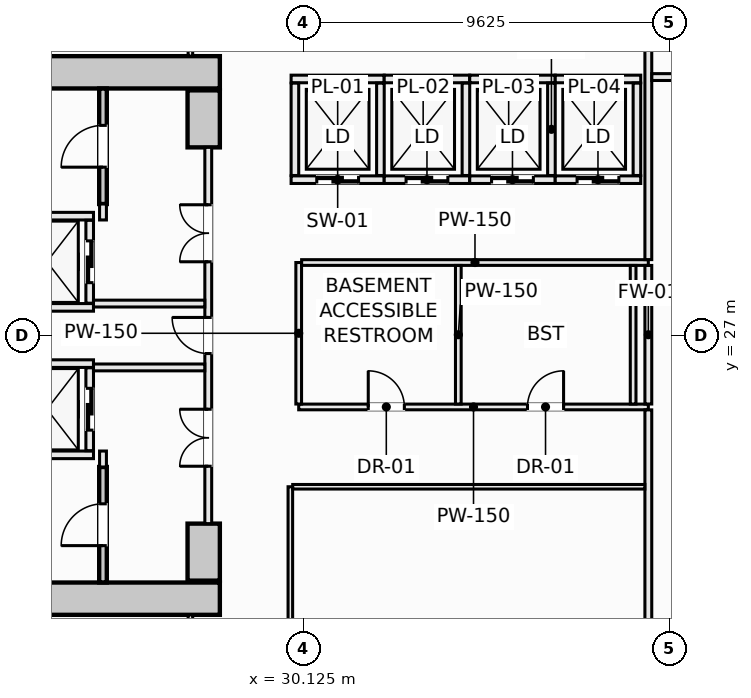
"""IFC4 building model, lengths in metres.
Left out: names, types, materials, properties, quantities, classifications, styles, units other than length and angle.
Written with IfcOpenShell. Run it as: python <this file> out.ifc"""

import sys

from ifc_helpers import new_model, si_unit, direction, frame, frame_2d, origin, place, context, subcontext, project, spatial, rectangle, extrude, element, fill, save


model = new_model("IFC4")
c1 = context("Model", 3, precision=1e-05, world=origin(), true_north=direction((0.0, 1.0)))
c2 = subcontext(c1, "Body", "Model", "MODEL_VIEW")
j1 = project(units=[si_unit("LENGTHUNIT", "METRE"), si_unit("PLANEANGLEUNIT", "RADIAN")], contexts=[c1])
p1 = place(None, origin())
s1 = spatial("IfcSite", under=j1, at=p1, CompositionType="ELEMENT")
p2 = place(p1, origin())
s2 = spatial("IfcBuilding", under=s1, at=p2, CompositionType="ELEMENT")
p3 = place(p2, frame((0.0, 0.0, -13.5)))
s3 = spatial("IfcBuildingStorey", under=s2, at=p3, CompositionType="ELEMENT", Elevation=-13.5)
for number, where, z_axis, x_axis in (
    (1, (14.075, 33.925, -0.5), (0.0, 0.0, 1.0), (1.0, 0.0, 0.0)),
    (2, (14.075, 20.075, -0.5), (0.0, 0.0, 1.0), (1.0, 0.0, 0.0)),
):
    element("IfcWall", number, at=place(p3, frame(where, z_axis=z_axis, x_axis=x_axis)), inside=s3, PredefinedType="SHEAR", context=c2, shape_type="SweptSolid", body=[
        extrude(rectangle(XDim=13.85, YDim=0.85, at=frame_2d((6.925, 0.0))), origin(), (0.0, 0.0, 1.0), 4.68),
    ])
for number, where, z_axis, x_axis in (
    (3, (27.5, 31.95, -0.5), (0.0, 0.0, 1.0), (0.0, 1.0, 0.0)),
    (4, (27.5, 20.55, -0.5), (0.0, 0.0, 1.0), (0.0, 1.0, 0.0)),
):
    element("IfcWall", number, at=place(p3, frame(where, z_axis=z_axis, x_axis=x_axis)), inside=s3, PredefinedType="SHEAR", context=c2, shape_type="SweptSolid", body=[
        extrude(rectangle(XDim=1.5, YDim=0.85, at=frame_2d((0.75, 0.0))), origin(), (0.0, 0.0, 1.0), 4.68),
    ])
p4 = place(p3, frame((24.85, 30.46, -0.5), z_axis=(0.0, 0.0, 1.0), x_axis=(0.0, 1.0, 0.0)))
e5 = element("IfcWall", 5, at=p4, inside=s3, PredefinedType="SHEAR", context=c2, shape_type="SweptSolid", body=[
    extrude(rectangle(XDim=3.038, YDim=0.2, at=frame_2d((1.519, 0.0))), origin(), (0.0, 0.0, 1.0), 4.68),
])
p5 = place(p4, frame((0.969, 0.0, 0.5)))
e6 = element("IfcOpeningElement", 6, at=p5, cuts=e5, PredefinedType="OPENING", context=c2, shape_type="SweptSolid", body=[
    extrude(rectangle(XDim=1.1, YDim=2.15, at=frame_2d((0.55, 1.075))), frame((0.0, 0.11, 0.0), z_axis=(0.0, -1.0, 0.0), x_axis=(1.0, 0.0, 0.0)), (0.0, 0.0, 1.0), 0.22),
])
p6 = place(p3, frame((24.85, 20.502, -0.5), z_axis=(0.0, 0.0, 1.0), x_axis=(0.0, 1.0, 0.0)))
e7 = element("IfcWall", 7, at=p6, inside=s3, PredefinedType="SHEAR", context=c2, shape_type="SweptSolid", body=[
    extrude(rectangle(XDim=3.038, YDim=0.2, at=frame_2d((1.519, 0.0))), origin(), (0.0, 0.0, 1.0), 4.68),
])
p7 = place(p6, frame((0.969, 0.0, 0.5)))
e8 = element("IfcOpeningElement", 8, at=p7, cuts=e7, PredefinedType="OPENING", context=c2, shape_type="SweptSolid", body=[
    extrude(rectangle(XDim=1.1, YDim=2.15, at=frame_2d((0.55, 1.075))), frame((0.0, 0.11, 0.0), z_axis=(0.0, -1.0, 0.0), x_axis=(1.0, 0.0, 0.0)), (0.0, 0.0, 1.0), 0.22),
])
for number, where, z_axis, x_axis in (
    (9, (22.15, 30.14, 0.0), (0.0, 0.0, 1.0), (1.0, 0.0, 0.0)),
    (10, (22.15, 27.74, 0.0), (0.0, 0.0, 1.0), (1.0, 0.0, 0.0)),
):
    element("IfcWall", number, at=place(p3, frame(where, z_axis=z_axis, x_axis=x_axis)), inside=s3, PredefinedType="SOLIDWALL", context=c2, shape_type="SweptSolid", body=[
        extrude(rectangle(XDim=2.45, YDim=0.2, at=frame_2d((1.225, 0.0))), origin(), (0.0, 0.0, 1.0), 4.18),
    ])
p8 = place(p3, frame((24.5, 27.85, 0.0), z_axis=(0.0, 0.0, 1.0), x_axis=(0.0, 1.0, 0.0)))
e11 = element("IfcWall", 11, at=p8, inside=s3, PredefinedType="SOLIDWALL", context=c2, shape_type="SweptSolid", body=[
    extrude(rectangle(XDim=2.18, YDim=0.2, at=frame_2d((1.09, 0.0))), origin(), (0.0, 0.0, 1.0), 4.18),
])
p9 = place(p8, frame((0.54, 0.0, 0.0)))
e12 = element("IfcOpeningElement", 12, at=p9, cuts=e11, PredefinedType="OPENING", context=c2, shape_type="SweptSolid", body=[
    extrude(rectangle(XDim=1.1, YDim=2.2, at=frame_2d((0.55, 1.1))), frame((0.0, 0.11, 0.0), z_axis=(0.0, -1.0, 0.0), x_axis=(1.0, 0.0, 0.0)), (0.0, 0.0, 1.0), 0.22),
])
for number, where, z_axis, x_axis in (
    (13, (22.15, 26.26, 0.0), (0.0, 0.0, 1.0), (1.0, 0.0, 0.0)),
    (14, (22.15, 23.86, 0.0), (0.0, 0.0, 1.0), (1.0, 0.0, 0.0)),
):
    element("IfcWall", number, at=place(p3, frame(where, z_axis=z_axis, x_axis=x_axis)), inside=s3, PredefinedType="SOLIDWALL", context=c2, shape_type="SweptSolid", body=[
        extrude(rectangle(XDim=2.45, YDim=0.2, at=frame_2d((1.225, 0.0))), origin(), (0.0, 0.0, 1.0), 4.18),
    ])
p10 = place(p3, frame((24.5, 23.97, 0.0), z_axis=(0.0, 0.0, 1.0), x_axis=(0.0, 1.0, 0.0)))
e15 = element("IfcWall", 15, at=p10, inside=s3, PredefinedType="SOLIDWALL", context=c2, shape_type="SweptSolid", body=[
    extrude(rectangle(XDim=2.18, YDim=0.2, at=frame_2d((1.09, 0.0))), origin(), (0.0, 0.0, 1.0), 4.18),
])
p11 = place(p10, frame((0.54, 0.0, 0.0)))
e16 = element("IfcOpeningElement", 16, at=p11, cuts=e15, PredefinedType="OPENING", context=c2, shape_type="SweptSolid", body=[
    extrude(rectangle(XDim=1.1, YDim=2.2, at=frame_2d((0.55, 1.1))), frame((0.0, 0.11, 0.0), z_axis=(0.0, -1.0, 0.0), x_axis=(1.0, 0.0, 0.0)), (0.0, 0.0, 1.0), 0.22),
])
p12 = place(p3, frame((29.8, 33.75, 0.0), z_axis=(0.0, 0.0, 1.0), x_axis=(1.0, 0.0, 0.0)))
e17 = element("IfcWall", 17, at=p12, inside=s3, PredefinedType="SOLIDWALL", context=c2, shape_type="SweptSolid", body=[
    extrude(rectangle(XDim=2.45, YDim=0.2, at=frame_2d((1.225, 0.0))), origin(), (0.0, 0.0, 1.0), 4.18),
])
p13 = place(p3, frame((29.8, 31.1, 0.0), z_axis=(0.0, 0.0, 1.0), x_axis=(1.0, 0.0, 0.0)))
e18 = element("IfcWall", 18, at=p13, inside=s3, PredefinedType="SOLIDWALL", context=c2, shape_type="SweptSolid", body=[
    extrude(rectangle(XDim=2.45, YDim=0.2, at=frame_2d((1.225, 0.0))), origin(), (0.0, 0.0, 1.0), 4.18),
])
p14 = place(p13, frame((0.675, 0.0, 0.0)))
e19 = element("IfcOpeningElement", 19, at=p14, cuts=e18, PredefinedType="OPENING", context=c2, shape_type="SweptSolid", body=[
    extrude(rectangle(XDim=1.1, YDim=2.2, at=frame_2d((0.55, 1.1))), frame((0.0, 0.11, 0.0), z_axis=(0.0, -1.0, 0.0), x_axis=(1.0, 0.0, 0.0)), (0.0, 0.0, 1.0), 0.22),
])
for number, where, z_axis, x_axis in (
    (20, (29.9, 31.21, 0.0), (0.0, 0.0, 1.0), (0.0, 1.0, 0.0)),
    (21, (32.15, 31.21, 0.0), (0.0, 0.0, 1.0), (0.0, 1.0, 0.0)),
):
    element("IfcWall", number, at=place(p3, frame(where, z_axis=z_axis, x_axis=x_axis)), inside=s3, PredefinedType="SOLIDWALL", context=c2, shape_type="SweptSolid", body=[
        extrude(rectangle(XDim=2.43, YDim=0.2, at=frame_2d((1.215, 0.0))), origin(), (0.0, 0.0, 1.0), 4.18),
    ])
p15 = place(p3, frame((32.25, 33.75, 0.0), z_axis=(0.0, 0.0, 1.0), x_axis=(1.0, 0.0, 0.0)))
e22 = element("IfcWall", 22, at=p15, inside=s3, PredefinedType="SOLIDWALL", context=c2, shape_type="SweptSolid", body=[
    extrude(rectangle(XDim=2.25, YDim=0.2, at=frame_2d((1.125, 0.0))), origin(), (0.0, 0.0, 1.0), 4.18),
])
p16 = place(p3, frame((32.25, 31.1, 0.0), z_axis=(0.0, 0.0, 1.0), x_axis=(1.0, 0.0, 0.0)))
e23 = element("IfcWall", 23, at=p16, inside=s3, PredefinedType="SOLIDWALL", context=c2, shape_type="SweptSolid", body=[
    extrude(rectangle(XDim=2.25, YDim=0.2, at=frame_2d((1.125, 0.0))), origin(), (0.0, 0.0, 1.0), 4.18),
])
p17 = place(p16, frame((0.575, 0.0, 0.0)))
e24 = element("IfcOpeningElement", 24, at=p17, cuts=e23, PredefinedType="OPENING", context=c2, shape_type="SweptSolid", body=[
    extrude(rectangle(XDim=1.1, YDim=2.2, at=frame_2d((0.55, 1.1))), frame((0.0, 0.11, 0.0), z_axis=(0.0, -1.0, 0.0), x_axis=(1.0, 0.0, 0.0)), (0.0, 0.0, 1.0), 0.22),
])
p18 = place(p3, frame((34.4, 31.21, 0.0), z_axis=(0.0, 0.0, 1.0), x_axis=(0.0, 1.0, 0.0)))
e25 = element("IfcWall", 25, at=p18, inside=s3, PredefinedType="SOLIDWALL", context=c2, shape_type="SweptSolid", body=[
    extrude(rectangle(XDim=2.43, YDim=0.2, at=frame_2d((1.215, 0.0))), origin(), (0.0, 0.0, 1.0), 4.18),
])
p19 = place(p3, frame((34.5, 33.75, 0.0), z_axis=(0.0, 0.0, 1.0), x_axis=(1.0, 0.0, 0.0)))
e26 = element("IfcWall", 26, at=p19, inside=s3, PredefinedType="SOLIDWALL", context=c2, shape_type="SweptSolid", body=[
    extrude(rectangle(XDim=2.25, YDim=0.2, at=frame_2d((1.125, 0.0))), origin(), (0.0, 0.0, 1.0), 4.18),
])
p20 = place(p3, frame((34.5, 31.1, 0.0), z_axis=(0.0, 0.0, 1.0), x_axis=(1.0, 0.0, 0.0)))
e27 = element("IfcWall", 27, at=p20, inside=s3, PredefinedType="SOLIDWALL", context=c2, shape_type="SweptSolid", body=[
    extrude(rectangle(XDim=2.25, YDim=0.2, at=frame_2d((1.125, 0.0))), origin(), (0.0, 0.0, 1.0), 4.18),
])
p21 = place(p20, frame((0.575, 0.0, 0.0)))
e28 = element("IfcOpeningElement", 28, at=p21, cuts=e27, PredefinedType="OPENING", context=c2, shape_type="SweptSolid", body=[
    extrude(rectangle(XDim=1.1, YDim=2.2, at=frame_2d((0.55, 1.1))), frame((0.0, 0.11, 0.0), z_axis=(0.0, -1.0, 0.0), x_axis=(1.0, 0.0, 0.0)), (0.0, 0.0, 1.0), 0.22),
])
p22 = place(p3, frame((36.65, 31.21, 0.0), z_axis=(0.0, 0.0, 1.0), x_axis=(0.0, 1.0, 0.0)))
e29 = element("IfcWall", 29, at=p22, inside=s3, PredefinedType="SOLIDWALL", context=c2, shape_type="SweptSolid", body=[
    extrude(rectangle(XDim=2.43, YDim=0.2, at=frame_2d((1.215, 0.0))), origin(), (0.0, 0.0, 1.0), 4.18),
])
p23 = place(p3, frame((36.75, 33.75, 0.0), z_axis=(0.0, 0.0, 1.0), x_axis=(1.0, 0.0, 0.0)))
e30 = element("IfcWall", 30, at=p23, inside=s3, PredefinedType="SOLIDWALL", context=c2, shape_type="SweptSolid", body=[
    extrude(rectangle(XDim=2.25, YDim=0.2, at=frame_2d((1.125, 0.0))), origin(), (0.0, 0.0, 1.0), 4.18),
])
p24 = place(p3, frame((36.75, 31.1, 0.0), z_axis=(0.0, 0.0, 1.0), x_axis=(1.0, 0.0, 0.0)))
e31 = element("IfcWall", 31, at=p24, inside=s3, PredefinedType="SOLIDWALL", context=c2, shape_type="SweptSolid", body=[
    extrude(rectangle(XDim=2.25, YDim=0.2, at=frame_2d((1.125, 0.0))), origin(), (0.0, 0.0, 1.0), 4.18),
])
p25 = place(p24, frame((0.575, 0.0, 0.0)))
e32 = element("IfcOpeningElement", 32, at=p25, cuts=e31, PredefinedType="OPENING", context=c2, shape_type="SweptSolid", body=[
    extrude(rectangle(XDim=1.1, YDim=2.2, at=frame_2d((0.55, 1.1))), frame((0.0, 0.11, 0.0), z_axis=(0.0, -1.0, 0.0), x_axis=(1.0, 0.0, 0.0)), (0.0, 0.0, 1.0), 0.22),
])
p26 = place(p3, frame((38.9, 31.21, 0.0), z_axis=(0.0, 0.0, 1.0), x_axis=(0.0, 1.0, 0.0)))
e33 = element("IfcWall", 33, at=p26, inside=s3, PredefinedType="SOLIDWALL", context=c2, shape_type="SweptSolid", body=[
    extrude(rectangle(XDim=2.43, YDim=0.2, at=frame_2d((1.215, 0.0))), origin(), (0.0, 0.0, 1.0), 4.18),
])
for number, where, z_axis, x_axis in (
    (34, (24.85, 23.54, 0.0), (0.0, 0.0, 1.0), (0.0, 1.0, 0.0)),
    (35, (24.85, 30.04, 0.0), (0.0, 0.0, 1.0), (0.0, 1.0, 0.0)),
):
    element("IfcWall", number, at=place(p3, frame(where, z_axis=z_axis, x_axis=x_axis)), inside=s3, PredefinedType="SOLIDWALL", context=c2, shape_type="SweptSolid", body=[
        extrude(rectangle(XDim=0.42, YDim=0.18, at=frame_2d((0.21, 0.0))), origin(), (0.0, 0.0, 1.0), 4.18),
    ])
p27 = place(p3, frame((27.62, 22.05, 0.0), z_axis=(0.0, 0.0, 1.0), x_axis=(0.0, 1.0, 0.0)))
e36 = element("IfcWall", 36, at=p27, inside=s3, PredefinedType="SOLIDWALL", context=c2, shape_type="SweptSolid", body=[
    extrude(rectangle(XDim=9.9, YDim=0.18, at=frame_2d((4.95, 0.0))), origin(), (0.0, 0.0, 1.0), 3.272),
])
p28 = place(p27, frame((4.475, 0.0, 0.0)))
e37 = element("IfcOpeningElement", 37, at=p28, cuts=e36, PredefinedType="OPENING", context=c2, shape_type="SweptSolid", body=[
    extrude(rectangle(XDim=0.95, YDim=2.1, at=frame_2d((0.475, 1.05))), frame((0.0, 0.1, 0.0), z_axis=(0.0, -1.0, 0.0), x_axis=(1.0, 0.0, 0.0)), (0.0, 0.0, 1.0), 0.2),
])
p29 = place(p27, frame((6.89, 0.0, 0.0)))
e38 = element("IfcOpeningElement", 38, at=p29, cuts=e36, PredefinedType="OPENING", context=c2, shape_type="SweptSolid", body=[
    extrude(rectangle(XDim=1.5, YDim=2.2, at=frame_2d((0.75, 1.1))), frame((0.0, 0.1, 0.0), z_axis=(0.0, -1.0, 0.0), x_axis=(1.0, 0.0, 0.0)), (0.0, 0.0, 1.0), 0.2),
])
p30 = place(p27, frame((1.51, 0.0, 0.0)))
e39 = element("IfcOpeningElement", 39, at=p30, cuts=e36, PredefinedType="OPENING", context=c2, shape_type="SweptSolid", body=[
    extrude(rectangle(XDim=1.5, YDim=2.2, at=frame_2d((0.75, 1.1))), frame((0.0, 0.1, 0.0), z_axis=(0.0, -1.0, 0.0), x_axis=(1.0, 0.0, 0.0)), (0.0, 0.0, 1.0), 0.2),
])
for number, where, z_axis, x_axis in (
    (40, (24.6, 27.84, 0.0), (0.0, 0.0, 1.0), (1.0, 0.0, 0.0)),
    (41, (24.6, 26.16, 0.0), (0.0, 0.0, 1.0), (1.0, 0.0, 0.0)),
):
    element("IfcWall", number, at=place(p3, frame(where, z_axis=z_axis, x_axis=x_axis)), inside=s3, PredefinedType="SOLIDWALL", context=c2, shape_type="SweptSolid", body=[
        extrude(rectangle(XDim=2.928, YDim=0.18, at=frame_2d((1.464, 0.0))), origin(), (0.0, 0.0, 1.0), 4.18),
    ])
p31 = place(p3, frame((30.0, 25.12, 0.0), z_axis=(0.0, 0.0, 1.0), x_axis=(1.0, 0.0, 0.0)))
e42 = element("IfcWall", 42, at=p31, inside=s3, PredefinedType="PARTITIONING", context=c2, shape_type="SweptSolid", body=[
    extrude(rectangle(XDim=9.2, YDim=0.15, at=frame_2d((4.6, 0.0))), origin(), (0.0, 0.0, 1.0), 4.18),
])
p32 = place(p31, frame((1.83, 0.0, 0.0)))
e43 = element("IfcOpeningElement", 43, at=p32, cuts=e42, PredefinedType="OPENING", context=c2, shape_type="SweptSolid", body=[
    extrude(rectangle(XDim=0.95, YDim=2.1, at=frame_2d((0.475, 1.05))), frame((0.0, 0.085, 0.0), z_axis=(0.0, -1.0, 0.0), x_axis=(1.0, 0.0, 0.0)), (0.0, 0.0, 1.0), 0.17),
])
p33 = place(p31, frame((6.02, 0.0, 0.0)))
e44 = element("IfcOpeningElement", 44, at=p33, cuts=e42, PredefinedType="OPENING", context=c2, shape_type="SweptSolid", body=[
    extrude(rectangle(XDim=0.95, YDim=2.1, at=frame_2d((0.475, 1.05))), frame((0.0, 0.085, 0.0), z_axis=(0.0, -1.0, 0.0), x_axis=(1.0, 0.0, 0.0)), (0.0, 0.0, 1.0), 0.17),
])
p34 = place(p3, frame((30.0, 25.197, 0.0), z_axis=(0.0, 0.0, 1.0), x_axis=(0.0, 1.0, 0.0)))
e45 = element("IfcWall", 45, at=p34, inside=s3, PredefinedType="PARTITIONING", context=c2, shape_type="SweptSolid", body=[
    extrude(rectangle(XDim=3.723, YDim=0.15, at=frame_2d((1.861, 0.0))), origin(), (0.0, 0.0, 1.0), 4.18),
])
p35 = place(p3, frame((30.077, 28.92, 0.0), z_axis=(0.0, 0.0, 1.0), x_axis=(1.0, 0.0, 0.0)))
e46 = element("IfcWall", 46, at=p35, inside=s3, PredefinedType="PARTITIONING", context=c2, shape_type="SweptSolid", body=[
    extrude(rectangle(XDim=9.123, YDim=0.15, at=frame_2d((4.562, 0.0))), origin(), (0.0, 0.0, 1.0), 4.18),
])
for number, where, z_axis, x_axis in (
    (47, (34.2, 25.197, 0.0), (0.0, 0.0, 1.0), (0.0, 1.0, 0.0)),
    (48, (38.8, 25.197, 0.0), (0.0, 0.0, 1.0), (0.0, 1.0, 0.0)),
):
    element("IfcWall", number, at=place(p3, frame(where, z_axis=z_axis, x_axis=x_axis)), inside=s3, PredefinedType="PARTITIONING", context=c2, shape_type="SweptSolid", body=[
        extrude(rectangle(XDim=3.646, YDim=0.15, at=frame_2d((1.823, 0.0))), origin(), (0.0, 0.0, 1.0), 4.18),
    ])
p36 = place(p3, frame((27.15, 17.112, 0.0), z_axis=(0.0, 0.0, 1.0), x_axis=(0.0, 1.0, 0.0)))
e49 = element("IfcWall", 49, at=p36, inside=s3, PredefinedType="PARTITIONING", context=c2, shape_type="SweptSolid", body=[
    extrude(rectangle(XDim=2.536, YDim=0.12, at=frame_2d((1.268, 0.0))), origin(), (0.0, 0.0, 1.0), 4.18),
])
p37 = place(p3, frame((27.15, 34.352, 0.0), z_axis=(0.0, 0.0, 1.0), x_axis=(0.0, 1.0, 0.0)))
e50 = element("IfcWall", 50, at=p37, inside=s3, PredefinedType="PARTITIONING", context=c2, shape_type="SweptSolid", body=[
    extrude(rectangle(XDim=0.606, YDim=0.12, at=frame_2d((0.303, 0.0))), origin(), (0.0, 0.0, 1.0), 4.18),
])
p38 = place(p3, frame((39.2, 3.2, 0.0), z_axis=(0.0, 0.0, 1.0), x_axis=(0.0, 1.0, 0.0)))
e51 = element("IfcWall", 51, at=p38, inside=s3, PredefinedType="SOLIDWALL", context=c2, shape_type="SweptSolid", body=[
    extrude(rectangle(XDim=21.843, YDim=0.18, at=frame_2d((10.921, 0.0))), origin(), (0.0, 0.0, 1.0), 3.414),
])
p39 = place(p3, frame((39.2, 25.197, 0.0), z_axis=(0.0, 0.0, 1.0), x_axis=(0.0, 1.0, 0.0)))
e52 = element("IfcWall", 52, at=p39, inside=s3, PredefinedType="SOLIDWALL", context=c2, shape_type="SweptSolid", body=[
    extrude(rectangle(XDim=3.646, YDim=0.18, at=frame_2d((1.823, 0.0))), origin(), (0.0, 0.0, 1.0), 4.18),
])
p40 = place(p3, frame((39.2, 28.997, 0.0), z_axis=(0.0, 0.0, 1.0), x_axis=(0.0, 1.0, 0.0)))
e53 = element("IfcWall", 53, at=p40, inside=s3, PredefinedType="SOLIDWALL", context=c2, shape_type="SweptSolid", body=[
    extrude(rectangle(XDim=15.111, YDim=0.18, at=frame_2d((7.555, 0.0))), origin(), (0.0, 0.0, 1.0), 3.414),
])
p41 = place(p40, frame((9.312, 0.0, 0.0)))
e54 = element("IfcOpeningElement", 54, at=p41, cuts=e53, PredefinedType="OPENING", context=c2, shape_type="SweptSolid", body=[
    extrude(rectangle(XDim=0.95, YDim=2.1, at=frame_2d((0.475, 1.05))), frame((0.0, 0.1, 0.0), z_axis=(0.0, -1.0, 0.0), x_axis=(1.0, 0.0, 0.0)), (0.0, 0.0, 1.0), 0.2),
])
p42 = place(p3, frame((29.78, 15.65, 0.0), z_axis=(0.0, 0.0, 1.0), x_axis=(0.0, 1.0, 0.0)))
e55 = element("IfcWall", 55, at=p42, inside=s3, PredefinedType="PARTITIONING", context=c2, shape_type="SweptSolid", body=[
    extrude(rectangle(XDim=7.37, YDim=0.12, at=frame_2d((3.685, 0.0))), origin(), (0.0, 0.0, 1.0), 4.18),
])
p43 = place(p3, frame((29.842, 23.02, 0.0), z_axis=(0.0, 0.0, 1.0), x_axis=(1.0, 0.0, 0.0)))
e56 = element("IfcWall", 56, at=p43, inside=s3, PredefinedType="PARTITIONING", context=c2, shape_type="SweptSolid", body=[
    extrude(rectangle(XDim=9.266, YDim=0.12, at=frame_2d((4.633, 0.0))), origin(), (0.0, 0.0, 1.0), 4.18),
])
p44 = place(p3, frame((39.292, 33.8, 0.0), z_axis=(0.0, 0.0, 1.0), x_axis=(1.0, 0.0, 0.0)))
e57 = element("IfcWall", 57, at=p44, inside=s3, PredefinedType="SOLIDWALL", context=c2, shape_type="SweptSolid", body=[
    extrude(rectangle(XDim=9.416, YDim=0.18, at=frame_2d((4.708, 0.0))), origin(), (0.0, 0.0, 1.0), 3.815),
])
p45 = place(p5, origin())
e58 = element("IfcDoor", 58, at=p45, inside=s3, OperationType="SINGLE_SWING_LEFT", PredefinedType="DOOR", context=c2, shape_type="SweptSolid", body=[
    extrude(rectangle(XDim=1.1, YDim=2.15, at=frame_2d((0.55, 1.075))), frame((0.0, 0.025, 0.0), z_axis=(0.0, -1.0, 0.0), x_axis=(1.0, 0.0, 0.0)), (0.0, 0.0, 1.0), 0.05),
])
fill(e6, e58)
p46 = place(p7, origin())
e59 = element("IfcDoor", 59, at=p46, inside=s3, OperationType="SINGLE_SWING_LEFT", PredefinedType="DOOR", context=c2, shape_type="SweptSolid", body=[
    extrude(rectangle(XDim=1.1, YDim=2.15, at=frame_2d((0.55, 1.075))), frame((0.0, 0.025, 0.0), z_axis=(0.0, -1.0, 0.0), x_axis=(1.0, 0.0, 0.0)), (0.0, 0.0, 1.0), 0.05),
])
fill(e8, e59)
p47 = place(p9, origin())
e60 = element("IfcDoor", 60, at=p47, inside=s3, OperationType="SLIDING_TO_LEFT", PredefinedType="DOOR", context=c2, shape_type="SweptSolid", body=[
    extrude(rectangle(XDim=1.1, YDim=2.2, at=frame_2d((0.55, 1.1))), frame((0.0, 0.025, 0.0), z_axis=(0.0, -1.0, 0.0), x_axis=(1.0, 0.0, 0.0)), (0.0, 0.0, 1.0), 0.05),
])
fill(e12, e60)
p48 = place(p11, origin())
e61 = element("IfcDoor", 61, at=p48, inside=s3, OperationType="SLIDING_TO_LEFT", PredefinedType="DOOR", context=c2, shape_type="SweptSolid", body=[
    extrude(rectangle(XDim=1.1, YDim=2.2, at=frame_2d((0.55, 1.1))), frame((0.0, 0.025, 0.0), z_axis=(0.0, -1.0, 0.0), x_axis=(1.0, 0.0, 0.0)), (0.0, 0.0, 1.0), 0.05),
])
fill(e16, e61)
p49 = place(p14, origin())
e62 = element("IfcDoor", 62, at=p49, inside=s3, OperationType="SLIDING_TO_LEFT", PredefinedType="DOOR", context=c2, shape_type="SweptSolid", body=[
    extrude(rectangle(XDim=1.1, YDim=2.2, at=frame_2d((0.55, 1.1))), frame((0.0, 0.025, 0.0), z_axis=(0.0, -1.0, 0.0), x_axis=(1.0, 0.0, 0.0)), (0.0, 0.0, 1.0), 0.05),
])
fill(e19, e62)
p50 = place(p17, origin())
e63 = element("IfcDoor", 63, at=p50, inside=s3, OperationType="SLIDING_TO_LEFT", PredefinedType="DOOR", context=c2, shape_type="SweptSolid", body=[
    extrude(rectangle(XDim=1.1, YDim=2.2, at=frame_2d((0.55, 1.1))), frame((0.0, 0.025, 0.0), z_axis=(0.0, -1.0, 0.0), x_axis=(1.0, 0.0, 0.0)), (0.0, 0.0, 1.0), 0.05),
])
fill(e24, e63)
p51 = place(p21, origin())
e64 = element("IfcDoor", 64, at=p51, inside=s3, OperationType="SLIDING_TO_LEFT", PredefinedType="DOOR", context=c2, shape_type="SweptSolid", body=[
    extrude(rectangle(XDim=1.1, YDim=2.2, at=frame_2d((0.55, 1.1))), frame((0.0, 0.025, 0.0), z_axis=(0.0, -1.0, 0.0), x_axis=(1.0, 0.0, 0.0)), (0.0, 0.0, 1.0), 0.05),
])
fill(e28, e64)
p52 = place(p25, origin())
e65 = element("IfcDoor", 65, at=p52, inside=s3, OperationType="SLIDING_TO_LEFT", PredefinedType="DOOR", context=c2, shape_type="SweptSolid", body=[
    extrude(rectangle(XDim=1.1, YDim=2.2, at=frame_2d((0.55, 1.1))), frame((0.0, 0.025, 0.0), z_axis=(0.0, -1.0, 0.0), x_axis=(1.0, 0.0, 0.0)), (0.0, 0.0, 1.0), 0.05),
])
fill(e32, e65)
p53 = place(p28, origin())
e66 = element("IfcDoor", 66, at=p53, inside=s3, OperationType="SINGLE_SWING_RIGHT", PredefinedType="DOOR", context=c2, shape_type="SweptSolid", body=[
    extrude(rectangle(XDim=0.95, YDim=2.1, at=frame_2d((0.475, 1.05))), frame((0.0, 0.025, 0.0), z_axis=(0.0, -1.0, 0.0), x_axis=(1.0, 0.0, 0.0)), (0.0, 0.0, 1.0), 0.05),
])
fill(e37, e66)
p54 = place(p29, origin())
e67 = element("IfcDoor", 67, at=p54, inside=s3, OperationType="DOUBLE_DOOR_SINGLE_SWING", PredefinedType="DOOR", context=c2, shape_type="SweptSolid", body=[
    extrude(rectangle(XDim=1.5, YDim=2.2, at=frame_2d((0.75, 1.1))), frame((0.0, 0.025, 0.0), z_axis=(0.0, -1.0, 0.0), x_axis=(1.0, 0.0, 0.0)), (0.0, 0.0, 1.0), 0.05),
])
fill(e38, e67)
p55 = place(p30, origin())
e68 = element("IfcDoor", 68, at=p55, inside=s3, OperationType="DOUBLE_DOOR_SINGLE_SWING", PredefinedType="DOOR", context=c2, shape_type="SweptSolid", body=[
    extrude(rectangle(XDim=1.5, YDim=2.2, at=frame_2d((0.75, 1.1))), frame((0.0, 0.025, 0.0), z_axis=(0.0, -1.0, 0.0), x_axis=(1.0, 0.0, 0.0)), (0.0, 0.0, 1.0), 0.05),
])
fill(e39, e68)
p56 = place(p32, origin())
e69 = element("IfcDoor", 69, at=p56, inside=s3, OperationType="SINGLE_SWING_LEFT", PredefinedType="DOOR", context=c2, shape_type="SweptSolid", body=[
    extrude(rectangle(XDim=0.95, YDim=2.1, at=frame_2d((0.475, 1.05))), frame((0.0, 0.025, 0.0), z_axis=(0.0, -1.0, 0.0), x_axis=(1.0, 0.0, 0.0)), (0.0, 0.0, 1.0), 0.05),
])
fill(e43, e69)
p57 = place(p33, origin())
e70 = element("IfcDoor", 70, at=p57, inside=s3, OperationType="SINGLE_SWING_RIGHT", PredefinedType="DOOR", context=c2, shape_type="SweptSolid", body=[
    extrude(rectangle(XDim=0.95, YDim=2.1, at=frame_2d((0.475, 1.05))), frame((0.0, 0.025, 0.0), z_axis=(0.0, -1.0, 0.0), x_axis=(1.0, 0.0, 0.0)), (0.0, 0.0, 1.0), 0.05),
])
fill(e44, e70)
save(model, sys.argv[1])
